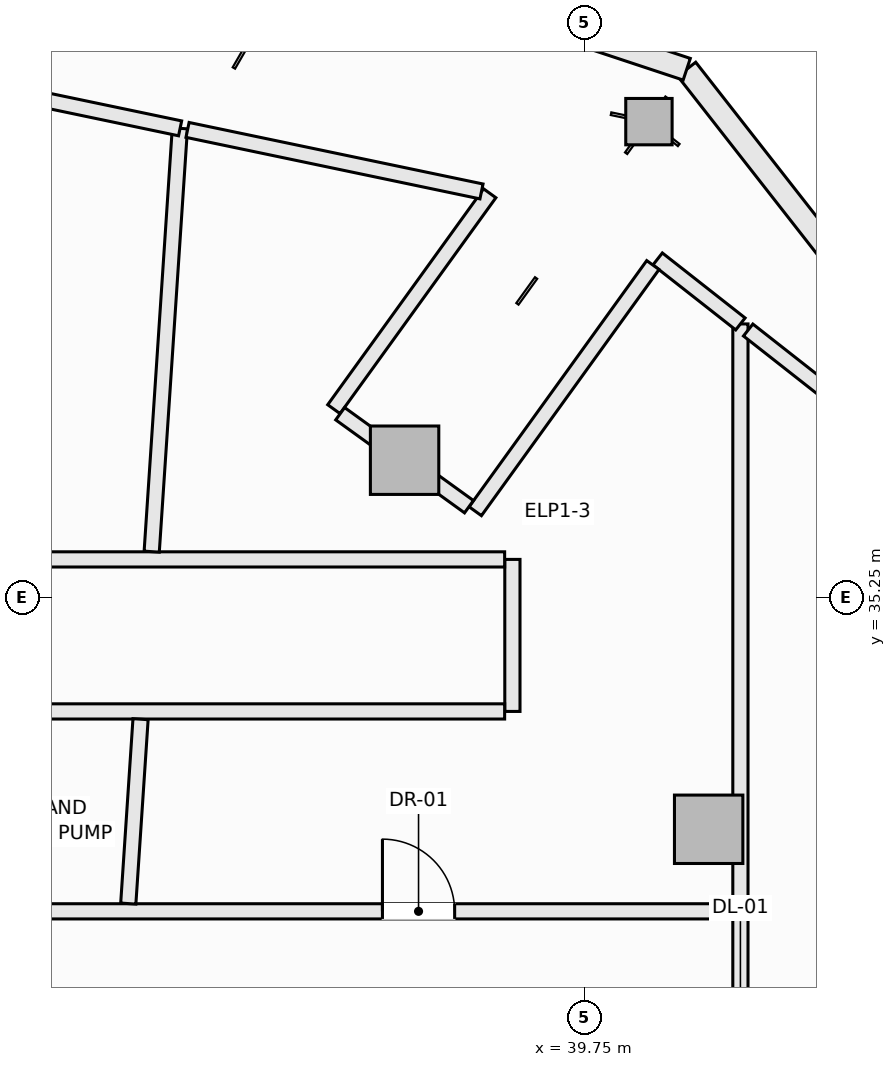
"""IFC4 building model, lengths in metres.
Left out: names, types, materials, properties, quantities, classifications, styles, units other than length and angle.
Written with IfcOpenShell. Run it as: python <this file> out.ifc"""

import sys

from ifc_helpers import new_model, si_unit, direction, frame, frame_2d, origin, origin_2d, place, context, subcontext, project, spatial, rectangle, hollow_rectangle, extrude, element, fill, save


model = new_model("IFC4")
c1 = context("Model", 3, precision=1e-05, world=origin(), true_north=direction((0.0, 1.0)))
c2 = subcontext(c1, "Body", "Model", "MODEL_VIEW")
j1 = project(units=[si_unit("LENGTHUNIT", "METRE"), si_unit("PLANEANGLEUNIT", "RADIAN")], contexts=[c1])
p1 = place(None, origin())
s1 = spatial("IfcSite", under=j1, at=p1, CompositionType="ELEMENT")
p2 = place(p1, origin())
s2 = spatial("IfcBuilding", under=s1, at=p2, CompositionType="ELEMENT")
p3 = place(p2, frame((0.0, 0.0, 186.9)))
s3 = spatial("IfcBuildingStorey", under=s2, at=p3, CompositionType="ELEMENT", Elevation=186.9)
p4 = place(p3, frame((40.596, 41.51, -0.32), z_axis=(0.0, 0.0, 1.0), x_axis=(1.0, 0.0, 0.0)))
e1 = element("IfcColumn", 1, at=p4, inside=s3, PredefinedType="COLUMN", context=c2, shape_type="SweptSolid", body=[
    extrude(hollow_rectangle(XDim=0.61, YDim=0.61, WallThickness=0.025, at=origin_2d()), origin(), (0.0, 0.0, 1.0), 5.04),
])
for number, where, z_axis, x_axis in (
    (2, (41.382, 32.199, -0.32), (0.0, 0.0, 1.0), (1.0, 0.0, 0.0)),
    (3, (37.382, 37.055, -0.32), (0.0, 0.0, 1.0), (1.0, 0.0, 0.0)),
):
    element("IfcColumn", number, at=place(p3, frame(where, z_axis=z_axis, x_axis=x_axis)), inside=s3, PredefinedType="COLUMN", context=c2, shape_type="SweptSolid", body=[
        extrude(rectangle(XDim=0.9, YDim=0.9, at=origin_2d()), origin(), (0.0, 0.0, 1.0), 5.04),
    ])
p5 = place(p3, frame((41.094, 42.199, 0.0), z_axis=(0.0, 0.0, 1.0), x_axis=(0.616429245738, -0.787410302828, 0.0)))
e4 = element("IfcWall", 4, at=p5, inside=s3, PredefinedType="SOLIDWALL", context=c2, shape_type="SweptSolid", body=[
    extrude(rectangle(XDim=5.223, YDim=0.3, at=frame_2d((2.612, 0.0))), origin(), (0.0, 0.0, 1.0), 1.15),
])
p6 = place(p3, frame((35.803, 43.952, 0.0), z_axis=(0.0, 0.0, 1.0), x_axis=(0.949246811547, -0.314532177636, 0.0)))
e5 = element("IfcWall", 5, at=p6, inside=s3, PredefinedType="SOLIDWALL", context=c2, shape_type="SweptSolid", body=[
    extrude(rectangle(XDim=5.574, YDim=0.3, at=frame_2d((2.787, 0.0))), origin(), (0.0, 0.0, 1.0), 1.15),
])
p7 = place(p3, frame((38.8, 33.75, 0.0), z_axis=(0.0, 0.0, 1.0), x_axis=(0.0, 1.0, 0.0)))
e6 = element("IfcWall", 6, at=p7, inside=s3, PredefinedType="SOLIDWALL", context=c2, shape_type="SweptSolid", body=[
    extrude(rectangle(XDim=2.0, YDim=0.2, at=frame_2d((1.0, 0.0))), origin(), (0.0, 0.0, 1.0), 4.72),
])
p8 = place(p3, frame((29.882, 35.75, 0.0), z_axis=(0.0, 0.0, 1.0), x_axis=(1.0, 0.0, 0.0)))
e7 = element("IfcWall", 7, at=p8, inside=s3, PredefinedType="SOLIDWALL", context=c2, shape_type="SweptSolid", body=[
    extrude(rectangle(XDim=8.816, YDim=0.2, at=frame_2d((4.408, 0.0))), origin(), (0.0, 0.0, 1.0), 4.095),
])
p9 = place(p8, frame((1.814, 0.0, 0.0)))
e8 = element("IfcOpeningElement", 8, at=p9, cuts=e7, PredefinedType="OPENING", context=c2, shape_type="SweptSolid", body=[
    extrude(rectangle(XDim=0.95, YDim=2.1, at=frame_2d((0.475, 1.05))), frame((0.0, 0.11, 0.0), z_axis=(0.0, -1.0, 0.0), x_axis=(1.0, 0.0, 0.0)), (0.0, 0.0, 1.0), 0.22),
])
p10 = place(p3, frame((29.882, 33.75, 0.0), z_axis=(0.0, 0.0, 1.0), x_axis=(1.0, 0.0, 0.0)))
e9 = element("IfcWall", 9, at=p10, inside=s3, PredefinedType="SOLIDWALL", context=c2, shape_type="SweptSolid", body=[
    extrude(rectangle(XDim=8.816, YDim=0.2, at=frame_2d((4.408, 0.0))), origin(), (0.0, 0.0, 1.0), 4.72),
])
p11 = place(p10, frame((1.748, 0.0, 0.0)))
e10 = element("IfcOpeningElement", 10, at=p11, cuts=e9, PredefinedType="OPENING", context=c2, shape_type="SweptSolid", body=[
    extrude(rectangle(XDim=0.95, YDim=2.1, at=frame_2d((0.475, 1.05))), frame((0.0, 0.11, 0.0), z_axis=(0.0, -1.0, 0.0), x_axis=(1.0, 0.0, 0.0)), (0.0, 0.0, 1.0), 0.22),
])
p12 = place(p3, frame((29.882, 31.12, 0.0), z_axis=(0.0, 0.0, 1.0), x_axis=(1.0, 0.0, 0.0)))
e11 = element("IfcWall", 11, at=p12, inside=s3, PredefinedType="SOLIDWALL", context=c2, shape_type="SweptSolid", body=[
    extrude(rectangle(XDim=11.918, YDim=0.2, at=frame_2d((5.959, 0.0))), origin(), (0.0, 0.0, 1.0), 4.72),
])
p13 = place(p12, frame((7.208, 0.0, 0.0)))
e12 = element("IfcOpeningElement", 12, at=p13, cuts=e11, PredefinedType="OPENING", context=c2, shape_type="SweptSolid", body=[
    extrude(rectangle(XDim=0.95, YDim=2.1, at=frame_2d((0.475, 1.05))), frame((0.0, 0.11, 0.0), z_axis=(0.0, -1.0, 0.0), x_axis=(1.0, 0.0, 0.0)), (0.0, 0.0, 1.0), 0.22),
])
p14 = place(p3, frame((41.8, 23.02, 0.0), z_axis=(0.0, 0.0, 1.0), x_axis=(0.0, 1.0, 0.0)))
e13 = element("IfcWall", 13, at=p14, inside=s3, PredefinedType="SOLIDWALL", context=c2, shape_type="SweptSolid", body=[
    extrude(rectangle(XDim=7.998, YDim=0.2, at=frame_2d((3.999, 0.0))), origin(), (0.0, 0.0, 1.0), 4.095),
])
p15 = place(p14, frame((4.789, 0.0, 0.0)))
e14 = element("IfcOpeningElement", 14, at=p15, cuts=e13, PredefinedType="OPENING", context=c2, shape_type="SweptSolid", body=[
    extrude(rectangle(XDim=1.5, YDim=2.2, at=frame_2d((0.75, 1.1))), frame((0.0, 0.11, 0.0), z_axis=(0.0, -1.0, 0.0), x_axis=(1.0, 0.0, 0.0)), (0.0, 0.0, 1.0), 0.22),
])
p16 = place(p3, frame((41.8, 31.222, 0.0), z_axis=(0.0, 0.0, 1.0), x_axis=(0.0, 1.0, 0.0)))
e15 = element("IfcWall", 15, at=p16, inside=s3, PredefinedType="SOLIDWALL", context=c2, shape_type="SweptSolid", body=[
    extrude(rectangle(XDim=7.626, YDim=0.2, at=frame_2d((3.813, 0.0))), origin(), (0.0, 0.0, 1.0), 4.095),
])
p17 = place(p3, frame((40.711, 39.703, 0.0), z_axis=(0.0, 0.0, 1.0), x_axis=(0.78642846258, -0.617681368704, 0.0)))
e16 = element("IfcWall", 16, at=p17, inside=s3, PredefinedType="SOLIDWALL", context=c2, shape_type="SweptSolid", body=[
    extrude(rectangle(XDim=1.385, YDim=0.2, at=frame_2d((0.692, 0.0))), origin(), (0.0, 0.0, 1.0), 4.72),
])
p18 = place(p3, frame((41.902, 38.768, 0.0), z_axis=(0.0, 0.0, 1.0), x_axis=(0.786466634861, -0.617632764877, 0.0)))
e17 = element("IfcWall", 17, at=p18, inside=s3, PredefinedType="SOLIDWALL", context=c2, shape_type="SweptSolid", body=[
    extrude(rectangle(XDim=6.74, YDim=0.2, at=frame_2d((3.37, 0.0))), origin(), (0.0, 0.0, 1.0), 4.72),
])
p19 = place(p3, frame((38.312, 36.384, 0.0), z_axis=(0.0, 0.0, 1.0), x_axis=(0.585099922998, 0.810961207523, 0.0)))
e18 = element("IfcWall", 18, at=p19, inside=s3, PredefinedType="SOLIDWALL", context=c2, shape_type="SweptSolid", body=[
    extrude(rectangle(XDim=3.994, YDim=0.2, at=frame_2d((1.997, 0.0))), origin(), (0.0, 0.0, 1.0), 4.72),
])
p20 = place(p3, frame((36.451, 37.726, 0.0), z_axis=(0.0, 0.0, 1.0), x_axis=(0.585304799542, 0.810813351908, 0.0)))
e19 = element("IfcWall", 19, at=p20, inside=s3, PredefinedType="SOLIDWALL", context=c2, shape_type="SweptSolid", body=[
    extrude(rectangle(XDim=3.503, YDim=0.2, at=frame_2d((1.752, 0.0))), origin(), (0.0, 0.0, 1.0), 4.72),
])
p21 = place(p3, frame((33.746, 31.222, 0.0), z_axis=(0.0, 0.0, 1.0), x_axis=(0.066472359128, 0.997788266854, 0.0)))
e20 = element("IfcWall", 20, at=p21, inside=s3, PredefinedType="SOLIDWALL", context=c2, shape_type="SweptSolid", body=[
    extrude(rectangle(XDim=2.431, YDim=0.2, at=frame_2d((1.216, 0.0))), origin(), (0.0, 0.0, 1.0), 4.72),
])
p22 = place(p3, frame((34.054, 35.852, 0.0), z_axis=(0.0, 0.0, 1.0), x_axis=(0.066399978294, 0.997793086207, 0.0)))
e21 = element("IfcWall", 21, at=p22, inside=s3, PredefinedType="SOLIDWALL", context=c2, shape_type="SweptSolid", body=[
    extrude(rectangle(XDim=5.581, YDim=0.2, at=frame_2d((2.791, 0.0))), origin(), (0.0, 0.0, 1.0), 4.402),
])
p23 = place(p3, frame((31.275, 42.081, 0.0), z_axis=(0.0, 0.0, 1.0), x_axis=(0.978789564925, -0.204868220071, 0.0)))
e22 = element("IfcWall", 22, at=p23, inside=s3, PredefinedType="SOLIDWALL", context=c2, shape_type="SweptSolid", body=[
    extrude(rectangle(XDim=3.221, YDim=0.2, at=frame_2d((1.611, 0.0))), origin(), (0.0, 0.0, 1.0), 4.72),
])
p24 = place(p3, frame((34.526, 41.4, 0.0), z_axis=(0.0, 0.0, 1.0), x_axis=(0.978797539927, -0.204830114567, 0.0)))
e23 = element("IfcWall", 23, at=p24, inside=s3, PredefinedType="SOLIDWALL", context=c2, shape_type="SweptSolid", body=[
    extrude(rectangle(XDim=3.951, YDim=0.2, at=frame_2d((1.976, 0.0))), origin(), (0.0, 0.0, 1.0), 4.72),
])
p25 = place(p3, frame((36.534, 37.667, 0.0), z_axis=(0.0, 0.0, 1.0), x_axis=(0.810882468436, -0.585209041611, 0.0)))
e24 = element("IfcWall", 24, at=p25, inside=s3, PredefinedType="SOLIDWALL", context=c2, shape_type="SweptSolid", body=[
    extrude(rectangle(XDim=2.09, YDim=0.2, at=frame_2d((1.045, 0.0))), origin(), (0.0, 0.0, 1.0), 4.095),
])
p26 = place(p13, origin())
e25 = element("IfcDoor", 25, at=p26, inside=s3, OperationType="SINGLE_SWING_LEFT", PredefinedType="DOOR", context=c2, shape_type="SweptSolid", body=[
    extrude(rectangle(XDim=0.95, YDim=2.1, at=frame_2d((0.475, 1.05))), frame((0.0, 0.025, 0.0), z_axis=(0.0, -1.0, 0.0), x_axis=(1.0, 0.0, 0.0)), (0.0, 0.0, 1.0), 0.05),
])
fill(e12, e25)
save(model, sys.argv[1])
